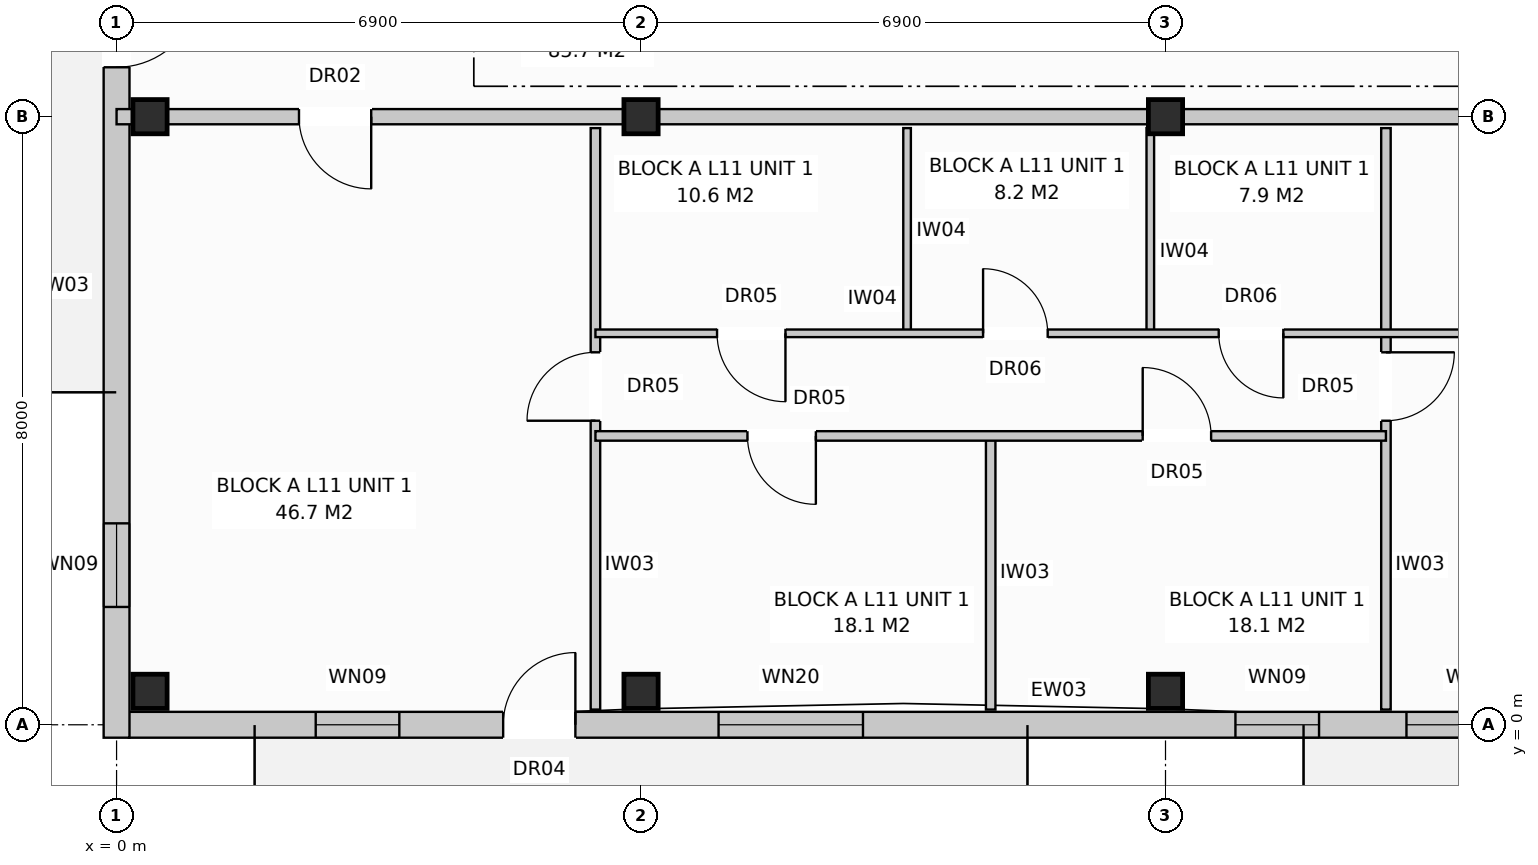
"""IFC4 building model, lengths in metres.
Left out: names, types, materials, properties, quantities, classifications, styles, units other than length and angle.
Written with IfcOpenShell. Run it as: python <this file> out.ifc"""

import sys

from ifc_helpers import new_model, si_unit, direction, frame, frame_2d, origin, origin_with_axes, origin_2d, place, context, subcontext, project, spatial, rectangle, extrude, element, fill, save


model = new_model("IFC4")
c1 = context("Model", 3, precision=1e-05, world=origin(), true_north=direction((0.0, 1.0)))
c2 = subcontext(c1, "Body", "Model", "MODEL_VIEW")
j1 = project(units=[si_unit("LENGTHUNIT", "METRE"), si_unit("PLANEANGLEUNIT", "RADIAN")], contexts=[c1])
p1 = place(None, origin())
s1 = spatial("IfcSite", under=j1, at=p1, CompositionType="ELEMENT")
p2 = place(p1, origin())
s2 = spatial("IfcBuilding", under=s1, at=p2, CompositionType="ELEMENT")
p3 = place(p2, frame((0.0, 0.0, 36.8)))
s3 = spatial("IfcBuildingStorey", under=s2, at=p3, CompositionType="ELEMENT", Elevation=36.8)
for number, where, z_axis, x_axis in (
    (1, (0.44, 0.44, 0.0), (0.0, 0.0, 1.0), (1.0, 0.0, 0.0)),
    (2, (0.44, 8.0, 0.0), (0.0, 0.0, 1.0), (1.0, 0.0, 0.0)),
    (3, (6.9, 0.44, 0.0), (0.0, 0.0, 1.0), (1.0, 0.0, 0.0)),
    (4, (6.9, 8.0, 0.0), (0.0, 0.0, 1.0), (1.0, 0.0, 0.0)),
    (5, (13.8, 0.44, 0.0), (0.0, 0.0, 1.0), (1.0, 0.0, 0.0)),
    (6, (13.8, 8.0, 0.0), (0.0, 0.0, 1.0), (1.0, 0.0, 0.0)),
):
    element("IfcColumn", number, at=place(p3, frame(where, z_axis=z_axis, x_axis=x_axis)), inside=s3, PredefinedType="COLUMN", context=c2, shape_type="SweptSolid", body=[
        extrude(rectangle(XDim=0.45, YDim=0.45, at=origin_2d()), origin(), (0.0, 0.0, 1.0), 3.2),
    ])
p4 = place(p3, frame((0.16, 0.0, 0.0), z_axis=(0.0, 0.0, 1.0), x_axis=(1.0, 0.0, 0.0)))
e7 = element("IfcWall", 7, at=p4, inside=s3, PredefinedType="STANDARD", context=c2, shape_type="SweptSolid", body=[
    extrude(rectangle(XDim=41.08, YDim=0.34, at=frame_2d((20.54, 0.0))), origin(), (0.0, 0.0, 1.0), 2.97),
])
p5 = place(p4, frame((4.926, 0.0, 0.0)))
e8 = element("IfcOpeningElement", 8, at=p5, cuts=e7, PredefinedType="OPENING", context=c2, shape_type="SweptSolid", body=[
    extrude(rectangle(XDim=0.95, YDim=2.1, at=frame_2d((0.475, 1.05))), frame((0.0, 0.182, 0.0), z_axis=(0.0, -1.0, 0.0), x_axis=(1.0, 0.0, 0.0)), (0.0, 0.0, 1.0), 0.364),
])
p6 = place(p4, frame((18.91, 0.0, 0.0)))
e9 = element("IfcOpeningElement", 9, at=p6, cuts=e7, PredefinedType="OPENING", context=c2, shape_type="SweptSolid", body=[
    extrude(rectangle(XDim=0.95, YDim=2.1, at=frame_2d((0.475, 1.05))), frame((0.0, 0.182, 0.0), z_axis=(0.0, -1.0, 0.0), x_axis=(1.0, 0.0, 0.0)), (0.0, 0.0, 1.0), 0.364),
])
p7 = place(p4, frame((30.426, 0.0, 0.0)))
e10 = element("IfcOpeningElement", 10, at=p7, cuts=e7, PredefinedType="OPENING", context=c2, shape_type="SweptSolid", body=[
    extrude(rectangle(XDim=0.95, YDim=2.1, at=frame_2d((0.475, 1.05))), frame((0.0, 0.182, 0.0), z_axis=(0.0, -1.0, 0.0), x_axis=(1.0, 0.0, 0.0)), (0.0, 0.0, 1.0), 0.364),
])
p8 = place(p4, frame((2.46, 0.0, 0.72)))
e11 = element("IfcOpeningElement", 11, at=p8, cuts=e7, PredefinedType="OPENING", context=c2, shape_type="SweptSolid", body=[
    extrude(rectangle(XDim=1.1, YDim=1.5, at=frame_2d((0.55, 0.75))), frame((0.0, 0.182, 0.0), z_axis=(0.0, -1.0, 0.0), x_axis=(1.0, 0.0, 0.0)), (0.0, 0.0, 1.0), 0.364),
])
p9 = place(p4, frame((7.76, 0.0, 0.72)))
e12 = element("IfcOpeningElement", 12, at=p9, cuts=e7, PredefinedType="OPENING", context=c2, shape_type="SweptSolid", body=[
    extrude(rectangle(XDim=1.9, YDim=1.85, at=frame_2d((0.95, 0.925))), frame((0.0, 0.182, 0.0), z_axis=(0.0, -1.0, 0.0), x_axis=(1.0, 0.0, 0.0)), (0.0, 0.0, 1.0), 0.364),
])
p10 = place(p4, frame((14.56, 0.0, 0.72)))
e13 = element("IfcOpeningElement", 13, at=p10, cuts=e7, PredefinedType="OPENING", context=c2, shape_type="SweptSolid", body=[
    extrude(rectangle(XDim=1.1, YDim=1.5, at=frame_2d((0.55, 0.75))), frame((0.0, 0.182, 0.0), z_axis=(0.0, -1.0, 0.0), x_axis=(1.0, 0.0, 0.0)), (0.0, 0.0, 1.0), 0.364),
])
p11 = place(p4, frame((16.81, 0.0, 0.8)))
e14 = element("IfcOpeningElement", 14, at=p11, cuts=e7, PredefinedType="OPENING", context=c2, shape_type="SweptSolid", body=[
    extrude(rectangle(XDim=1.8, YDim=1.7, at=frame_2d((0.9, 0.85))), frame((0.0, 0.182, 0.0), z_axis=(0.0, -1.0, 0.0), x_axis=(1.0, 0.0, 0.0)), (0.0, 0.0, 1.0), 0.364),
])
p12 = place(p4, frame((21.56, 0.0, 0.72)))
e15 = element("IfcOpeningElement", 15, at=p12, cuts=e7, PredefinedType="OPENING", context=c2, shape_type="SweptSolid", body=[
    extrude(rectangle(XDim=1.9, YDim=1.85, at=frame_2d((0.95, 0.925))), frame((0.0, 0.182, 0.0), z_axis=(0.0, -1.0, 0.0), x_axis=(1.0, 0.0, 0.0)), (0.0, 0.0, 1.0), 0.364),
])
p13 = place(p4, frame((25.36, 0.0, 0.72)))
e16 = element("IfcOpeningElement", 16, at=p13, cuts=e7, PredefinedType="OPENING", context=c2, shape_type="SweptSolid", body=[
    extrude(rectangle(XDim=1.1, YDim=1.5, at=frame_2d((0.55, 0.75))), frame((0.0, 0.182, 0.0), z_axis=(0.0, -1.0, 0.0), x_axis=(1.0, 0.0, 0.0)), (0.0, 0.0, 1.0), 0.364),
])
p14 = place(p4, frame((28.66, 0.0, 0.72)))
e17 = element("IfcOpeningElement", 17, at=p14, cuts=e7, PredefinedType="OPENING", context=c2, shape_type="SweptSolid", body=[
    extrude(rectangle(XDim=1.1, YDim=1.5, at=frame_2d((0.55, 0.75))), frame((0.0, 0.182, 0.0), z_axis=(0.0, -1.0, 0.0), x_axis=(1.0, 0.0, 0.0)), (0.0, 0.0, 1.0), 0.364),
])
p15 = place(p4, frame((31.96, 0.0, 0.72)))
e18 = element("IfcOpeningElement", 18, at=p15, cuts=e7, PredefinedType="OPENING", context=c2, shape_type="SweptSolid", body=[
    extrude(rectangle(XDim=1.9, YDim=1.85, at=frame_2d((0.95, 0.925))), frame((0.0, 0.182, 0.0), z_axis=(0.0, -1.0, 0.0), x_axis=(1.0, 0.0, 0.0)), (0.0, 0.0, 1.0), 0.364),
])
p16 = place(p4, frame((38.06, 0.0, 0.72)))
e19 = element("IfcOpeningElement", 19, at=p16, cuts=e7, PredefinedType="OPENING", context=c2, shape_type="SweptSolid", body=[
    extrude(rectangle(XDim=1.1, YDim=1.5, at=frame_2d((0.55, 0.75))), frame((0.0, 0.182, 0.0), z_axis=(0.0, -1.0, 0.0), x_axis=(1.0, 0.0, 0.0)), (0.0, 0.0, 1.0), 0.364),
])
p17 = place(p3, frame((0.0, -0.17, 0.0), z_axis=(0.0, 0.0, 1.0), x_axis=(0.0, 1.0, 0.0)))
e20 = element("IfcWall", 20, at=p17, inside=s3, PredefinedType="STANDARD", context=c2, shape_type="SweptSolid", body=[
    extrude(rectangle(XDim=18.74, YDim=0.34, at=frame_2d((9.37, 0.0))), origin(), (0.0, 0.0, 1.0), 2.97),
])
p18 = place(p17, frame((8.82, 0.0, 0.0)))
e21 = element("IfcOpeningElement", 21, at=p18, cuts=e20, PredefinedType="OPENING", context=c2, shape_type="SweptSolid", body=[
    extrude(rectangle(XDim=1.1, YDim=2.1, at=frame_2d((0.55, 1.05))), frame((0.0, 0.182, 0.0), z_axis=(0.0, -1.0, 0.0), x_axis=(1.0, 0.0, 0.0)), (0.0, 0.0, 1.0), 0.364),
])
p19 = place(p17, frame((1.72, 0.0, 0.72)))
e22 = element("IfcOpeningElement", 22, at=p19, cuts=e20, PredefinedType="OPENING", context=c2, shape_type="SweptSolid", body=[
    extrude(rectangle(XDim=1.1, YDim=1.5, at=frame_2d((0.55, 0.75))), frame((0.0, 0.182, 0.0), z_axis=(0.0, -1.0, 0.0), x_axis=(1.0, 0.0, 0.0)), (0.0, 0.0, 1.0), 0.364),
])
p20 = place(p17, frame((15.92, 0.0, 0.72)))
e23 = element("IfcOpeningElement", 23, at=p20, cuts=e20, PredefinedType="OPENING", context=c2, shape_type="SweptSolid", body=[
    extrude(rectangle(XDim=1.1, YDim=1.5, at=frame_2d((0.55, 0.75))), frame((0.0, 0.182, 0.0), z_axis=(0.0, -1.0, 0.0), x_axis=(1.0, 0.0, 0.0)), (0.0, 0.0, 1.0), 0.364),
])
p21 = place(p3, frame((0.0, 8.0, 0.0), z_axis=(0.0, 0.0, 1.0), x_axis=(1.0, 0.0, 0.0)))
e24 = element("IfcWall", 24, at=p21, inside=s3, PredefinedType="PARTITIONING", context=c2, shape_type="SweptSolid", body=[
    extrude(rectangle(XDim=20.7, YDim=0.2, at=frame_2d((10.35, 0.0))), origin(), (0.0, 0.0, 1.0), 2.41),
])
p22 = place(p21, frame((2.4, 0.0, 0.0)))
e25 = element("IfcOpeningElement", 25, at=p22, cuts=e24, PredefinedType="OPENING", context=c2, shape_type="SweptSolid", body=[
    extrude(rectangle(XDim=0.95, YDim=2.15, at=frame_2d((0.475, 1.075))), frame((0.0, 0.112, 0.0), z_axis=(0.0, -1.0, 0.0), x_axis=(1.0, 0.0, 0.0)), (0.0, 0.0, 1.0), 0.224),
])
p23 = place(p3, frame((6.3, 7.85, 0.0), z_axis=(0.0, 0.0, 1.0), x_axis=(0.0, -1.0, 0.0)))
e26 = element("IfcWall", 26, at=p23, inside=s3, PredefinedType="PARTITIONING", context=c2, shape_type="SweptSolid", body=[
    extrude(rectangle(XDim=7.65, YDim=0.125, at=frame_2d((3.825, 0.0))), origin(), (0.0, 0.0, 1.0), 2.97),
])
p24 = place(p23, frame((2.95, 0.0, 0.0)))
e27 = element("IfcOpeningElement", 27, at=p24, cuts=e26, PredefinedType="OPENING", context=c2, shape_type="SweptSolid", body=[
    extrude(rectangle(XDim=0.9, YDim=2.1, at=frame_2d((0.45, 1.05))), frame((0.0, 0.074, 0.0), z_axis=(0.0, -1.0, 0.0), x_axis=(1.0, 0.0, 0.0)), (0.0, 0.0, 1.0), 0.149),
])
for number, where, z_axis, x_axis in (
    (28, (10.4, 7.85, 0.0), (0.0, 0.0, 1.0), (0.0, -1.0, 0.0)),
    (29, (13.6, 7.85, 0.0), (0.0, 0.0, 1.0), (0.0, -1.0, 0.0)),
):
    element("IfcWall", number, at=place(p3, frame(where, z_axis=z_axis, x_axis=x_axis)), inside=s3, PredefinedType="PARTITIONING", context=c2, shape_type="SweptSolid", body=[
        extrude(rectangle(XDim=2.7, YDim=0.1, at=frame_2d((1.35, 0.0))), origin(), (0.0, 0.0, 1.0), 2.97),
    ])
p25 = place(p3, frame((11.5, 3.8, 0.0), z_axis=(0.0, 0.0, 1.0), x_axis=(0.0, -1.0, 0.0)))
e30 = element("IfcWall", 30, at=p25, inside=s3, PredefinedType="PARTITIONING", context=c2, shape_type="SweptSolid", body=[
    extrude(rectangle(XDim=3.6, YDim=0.125, at=frame_2d((1.8, 0.0))), origin(), (0.0, 0.0, 1.0), 2.59),
])
p26 = place(p3, frame((16.7, 7.85, 0.0), z_axis=(0.0, 0.0, 1.0), x_axis=(0.0, -1.0, 0.0)))
e31 = element("IfcWall", 31, at=p26, inside=s3, PredefinedType="PARTITIONING", context=c2, shape_type="SweptSolid", body=[
    extrude(rectangle(XDim=7.65, YDim=0.125, at=frame_2d((3.825, 0.0))), origin(), (0.0, 0.0, 1.0), 2.97),
])
p27 = place(p26, frame((2.95, 0.0, 0.0)))
e32 = element("IfcOpeningElement", 32, at=p27, cuts=e31, PredefinedType="OPENING", context=c2, shape_type="SweptSolid", body=[
    extrude(rectangle(XDim=0.9, YDim=2.1, at=frame_2d((0.45, 1.05))), frame((0.0, 0.074, 0.0), z_axis=(0.0, -1.0, 0.0), x_axis=(1.0, 0.0, 0.0)), (0.0, 0.0, 1.0), 0.149),
])
p28 = place(p3, frame((6.3, 5.15, 0.0), z_axis=(0.0, 0.0, 1.0), x_axis=(1.0, 0.0, 0.0)))
e33 = element("IfcWall", 33, at=p28, inside=s3, PredefinedType="PARTITIONING", context=c2, shape_type="SweptSolid", body=[
    extrude(rectangle(XDim=14.3, YDim=0.1, at=frame_2d((7.15, 0.0))), origin(), (0.0, 0.0, 1.0), 2.97),
])
p29 = place(p28, frame((1.6, 0.0, 0.0)))
e34 = element("IfcOpeningElement", 34, at=p29, cuts=e33, PredefinedType="OPENING", context=c2, shape_type="SweptSolid", body=[
    extrude(rectangle(XDim=0.9, YDim=2.1, at=frame_2d((0.45, 1.05))), frame((0.0, 0.062, 0.0), z_axis=(0.0, -1.0, 0.0), x_axis=(1.0, 0.0, 0.0)), (0.0, 0.0, 1.0), 0.124),
])
p30 = place(p28, frame((5.1, 0.0, 0.0)))
e35 = element("IfcOpeningElement", 35, at=p30, cuts=e33, PredefinedType="OPENING", context=c2, shape_type="SweptSolid", body=[
    extrude(rectangle(XDim=0.85, YDim=2.05, at=frame_2d((0.425, 1.025))), frame((0.0, 0.062, 0.0), z_axis=(0.0, -1.0, 0.0), x_axis=(1.0, 0.0, 0.0)), (0.0, 0.0, 1.0), 0.124),
])
p31 = place(p28, frame((8.2, 0.0, 0.0)))
e36 = element("IfcOpeningElement", 36, at=p31, cuts=e33, PredefinedType="OPENING", context=c2, shape_type="SweptSolid", body=[
    extrude(rectangle(XDim=0.85, YDim=2.05, at=frame_2d((0.425, 1.025))), frame((0.0, 0.062, 0.0), z_axis=(0.0, -1.0, 0.0), x_axis=(1.0, 0.0, 0.0)), (0.0, 0.0, 1.0), 0.124),
])
p32 = place(p28, frame((11.6, 0.0, 0.0)))
e37 = element("IfcOpeningElement", 37, at=p32, cuts=e33, PredefinedType="OPENING", context=c2, shape_type="SweptSolid", body=[
    extrude(rectangle(XDim=0.85, YDim=2.05, at=frame_2d((0.425, 1.025))), frame((0.0, 0.062, 0.0), z_axis=(0.0, -1.0, 0.0), x_axis=(1.0, 0.0, 0.0)), (0.0, 0.0, 1.0), 0.124),
])
p33 = place(p3, frame((6.3, 3.8, 0.0), z_axis=(0.0, 0.0, 1.0), x_axis=(1.0, 0.0, 0.0)))
e38 = element("IfcWall", 38, at=p33, inside=s3, PredefinedType="PARTITIONING", context=c2, shape_type="SweptSolid", body=[
    extrude(rectangle(XDim=10.4, YDim=0.125, at=frame_2d((5.2, 0.0))), origin(), (0.0, 0.0, 1.0), 2.97),
])
p34 = place(p33, frame((2.0, 0.0, 0.0)))
e39 = element("IfcOpeningElement", 39, at=p34, cuts=e38, PredefinedType="OPENING", context=c2, shape_type="SweptSolid", body=[
    extrude(rectangle(XDim=0.9, YDim=2.1, at=frame_2d((0.45, 1.05))), frame((0.0, 0.074, 0.0), z_axis=(0.0, -1.0, 0.0), x_axis=(1.0, 0.0, 0.0)), (0.0, 0.0, 1.0), 0.149),
])
p35 = place(p33, frame((7.2, 0.0, 0.0)))
e40 = element("IfcOpeningElement", 40, at=p35, cuts=e38, PredefinedType="OPENING", context=c2, shape_type="SweptSolid", body=[
    extrude(rectangle(XDim=0.9, YDim=2.1, at=frame_2d((0.45, 1.05))), frame((0.0, 0.074, 0.0), z_axis=(0.0, -1.0, 0.0), x_axis=(1.0, 0.0, 0.0)), (0.0, 0.0, 1.0), 0.149),
])
p36 = place(p5, origin_with_axes())
e41 = element("IfcDoor", 41, at=p36, inside=s3, OperationType="SINGLE_SWING_RIGHT", PredefinedType="DOOR", context=c2, shape_type="SweptSolid", body=[
    extrude(rectangle(XDim=0.95, YDim=2.1, at=frame_2d((0.475, 1.05))), frame((0.0, 0.025, 0.0), z_axis=(0.0, -1.0, 0.0), x_axis=(1.0, 0.0, 0.0)), (0.0, 0.0, 1.0), 0.05),
])
fill(e8, e41)
p37 = place(p8, origin_with_axes())
e42 = element("IfcWindow", 42, at=p37, inside=s3, PartitioningType="SINGLE_PANEL", PredefinedType="WINDOW", context=c2, shape_type="SweptSolid", body=[
    extrude(rectangle(XDim=1.1, YDim=1.5, at=frame_2d((0.55, 0.75))), frame((0.0, 0.03, 0.0), z_axis=(0.0, -1.0, 0.0), x_axis=(1.0, 0.0, 0.0)), (0.0, 0.0, 1.0), 0.06),
])
fill(e11, e42)
p38 = place(p9, origin_with_axes())
e43 = element("IfcWindow", 43, at=p38, inside=s3, PartitioningType="SINGLE_PANEL", PredefinedType="WINDOW", context=c2, shape_type="SweptSolid", body=[
    extrude(rectangle(XDim=1.9, YDim=1.85, at=frame_2d((0.95, 0.925))), frame((0.0, 0.03, 0.0), z_axis=(0.0, -1.0, 0.0), x_axis=(1.0, 0.0, 0.0)), (0.0, 0.0, 1.0), 0.06),
])
fill(e12, e43)
p39 = place(p10, origin_with_axes())
e44 = element("IfcWindow", 44, at=p39, inside=s3, PartitioningType="SINGLE_PANEL", PredefinedType="WINDOW", context=c2, shape_type="SweptSolid", body=[
    extrude(rectangle(XDim=1.1, YDim=1.5, at=frame_2d((0.55, 0.75))), frame((0.0, 0.03, 0.0), z_axis=(0.0, -1.0, 0.0), x_axis=(1.0, 0.0, 0.0)), (0.0, 0.0, 1.0), 0.06),
])
fill(e13, e44)
p40 = place(p11, origin_with_axes())
e45 = element("IfcWindow", 45, at=p40, inside=s3, PartitioningType="SINGLE_PANEL", PredefinedType="WINDOW", context=c2, shape_type="SweptSolid", body=[
    extrude(rectangle(XDim=1.8, YDim=1.7, at=frame_2d((0.9, 0.85))), frame((0.0, 0.03, 0.0), z_axis=(0.0, -1.0, 0.0), x_axis=(1.0, 0.0, 0.0)), (0.0, 0.0, 1.0), 0.06),
])
fill(e14, e45)
p41 = place(p18, frame((1.1, 0.0, 0.0), z_axis=(0.0, 0.0, 1.0), x_axis=(-1.0, 0.0, 0.0)))
e46 = element("IfcDoor", 46, at=p41, inside=s3, OperationType="SINGLE_SWING_RIGHT", PredefinedType="DOOR", context=c2, shape_type="SweptSolid", body=[
    extrude(rectangle(XDim=1.1, YDim=2.1, at=frame_2d((0.55, 1.05))), frame((0.0, 0.025, 0.0), z_axis=(0.0, -1.0, 0.0), x_axis=(1.0, 0.0, 0.0)), (0.0, 0.0, 1.0), 0.05),
])
fill(e21, e46)
p42 = place(p19, origin_with_axes())
e47 = element("IfcWindow", 47, at=p42, inside=s3, PartitioningType="SINGLE_PANEL", PredefinedType="WINDOW", context=c2, shape_type="SweptSolid", body=[
    extrude(rectangle(XDim=1.1, YDim=1.5, at=frame_2d((0.55, 0.75))), frame((0.0, 0.03, 0.0), z_axis=(0.0, -1.0, 0.0), x_axis=(1.0, 0.0, 0.0)), (0.0, 0.0, 1.0), 0.06),
])
fill(e22, e47)
p43 = place(p22, frame((0.95, 0.0, 0.0), z_axis=(0.0, 0.0, 1.0), x_axis=(-1.0, 0.0, 0.0)))
e48 = element("IfcDoor", 48, at=p43, inside=s3, OperationType="SINGLE_SWING_RIGHT", PredefinedType="DOOR", context=c2, shape_type="SweptSolid", body=[
    extrude(rectangle(XDim=0.95, YDim=2.15, at=frame_2d((0.475, 1.075))), frame((0.0, 0.025, 0.0), z_axis=(0.0, -1.0, 0.0), x_axis=(1.0, 0.0, 0.0)), (0.0, 0.0, 1.0), 0.05),
])
fill(e25, e48)
p44 = place(p24, frame((0.9, 0.0, 0.0), z_axis=(0.0, 0.0, 1.0), x_axis=(-1.0, 0.0, 0.0)))
e49 = element("IfcDoor", 49, at=p44, inside=s3, OperationType="SINGLE_SWING_RIGHT", PredefinedType="DOOR", context=c2, shape_type="SweptSolid", body=[
    extrude(rectangle(XDim=0.9, YDim=2.1, at=frame_2d((0.45, 1.05))), frame((0.0, 0.025, 0.0), z_axis=(0.0, -1.0, 0.0), x_axis=(1.0, 0.0, 0.0)), (0.0, 0.0, 1.0), 0.05),
])
fill(e27, e49)
p45 = place(p27, origin_with_axes())
e50 = element("IfcDoor", 50, at=p45, inside=s3, OperationType="SINGLE_SWING_LEFT", PredefinedType="DOOR", context=c2, shape_type="SweptSolid", body=[
    extrude(rectangle(XDim=0.9, YDim=2.1, at=frame_2d((0.45, 1.05))), frame((0.0, 0.025, 0.0), z_axis=(0.0, -1.0, 0.0), x_axis=(1.0, 0.0, 0.0)), (0.0, 0.0, 1.0), 0.05),
])
fill(e32, e50)
p46 = place(p29, frame((0.9, 0.0, 0.0), z_axis=(0.0, 0.0, 1.0), x_axis=(-1.0, 0.0, 0.0)))
e51 = element("IfcDoor", 51, at=p46, inside=s3, OperationType="SINGLE_SWING_RIGHT", PredefinedType="DOOR", context=c2, shape_type="SweptSolid", body=[
    extrude(rectangle(XDim=0.9, YDim=2.1, at=frame_2d((0.45, 1.05))), frame((0.0, 0.025, 0.0), z_axis=(0.0, -1.0, 0.0), x_axis=(1.0, 0.0, 0.0)), (0.0, 0.0, 1.0), 0.05),
])
fill(e34, e51)
p47 = place(p30, origin_with_axes())
e52 = element("IfcDoor", 52, at=p47, inside=s3, OperationType="SINGLE_SWING_LEFT", PredefinedType="DOOR", context=c2, shape_type="SweptSolid", body=[
    extrude(rectangle(XDim=0.85, YDim=2.05, at=frame_2d((0.425, 1.025))), frame((0.0, 0.025, 0.0), z_axis=(0.0, -1.0, 0.0), x_axis=(1.0, 0.0, 0.0)), (0.0, 0.0, 1.0), 0.05),
])
fill(e35, e52)
p48 = place(p31, frame((0.85, 0.0, 0.0), z_axis=(0.0, 0.0, 1.0), x_axis=(-1.0, 0.0, 0.0)))
e53 = element("IfcDoor", 53, at=p48, inside=s3, OperationType="SINGLE_SWING_RIGHT", PredefinedType="DOOR", context=c2, shape_type="SweptSolid", body=[
    extrude(rectangle(XDim=0.85, YDim=2.05, at=frame_2d((0.425, 1.025))), frame((0.0, 0.025, 0.0), z_axis=(0.0, -1.0, 0.0), x_axis=(1.0, 0.0, 0.0)), (0.0, 0.0, 1.0), 0.05),
])
fill(e36, e53)
p49 = place(p34, frame((0.9, 0.0, 0.0), z_axis=(0.0, 0.0, 1.0), x_axis=(-1.0, 0.0, 0.0)))
e54 = element("IfcDoor", 54, at=p49, inside=s3, OperationType="SINGLE_SWING_RIGHT", PredefinedType="DOOR", context=c2, shape_type="SweptSolid", body=[
    extrude(rectangle(XDim=0.9, YDim=2.1, at=frame_2d((0.45, 1.05))), frame((0.0, 0.025, 0.0), z_axis=(0.0, -1.0, 0.0), x_axis=(1.0, 0.0, 0.0)), (0.0, 0.0, 1.0), 0.05),
])
fill(e39, e54)
p50 = place(p35, origin_with_axes())
e55 = element("IfcDoor", 55, at=p50, inside=s3, OperationType="SINGLE_SWING_LEFT", PredefinedType="DOOR", context=c2, shape_type="SweptSolid", body=[
    extrude(rectangle(XDim=0.9, YDim=2.1, at=frame_2d((0.45, 1.05))), frame((0.0, 0.025, 0.0), z_axis=(0.0, -1.0, 0.0), x_axis=(1.0, 0.0, 0.0)), (0.0, 0.0, 1.0), 0.05),
])
fill(e40, e55)
save(model, sys.argv[1])
